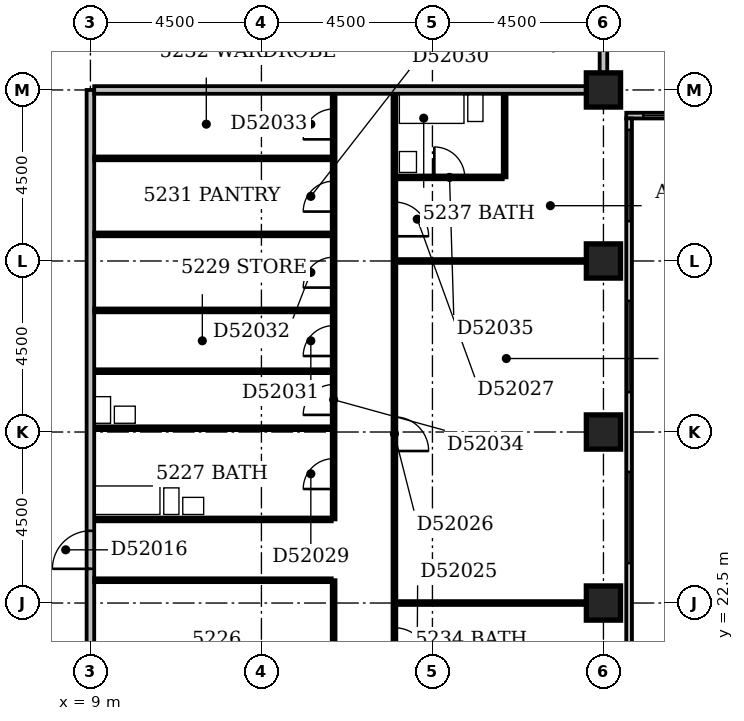
"""IFC4 building model, lengths in metres.
Left out: names, types, materials, properties, quantities, classifications, styles, units other than length and angle.
Written with IfcOpenShell. Run it as: python <this file> out.ifc"""

import sys

from ifc_helpers import new_model, si_unit, direction, frame, frame_2d, origin, origin_2d, place, context, subcontext, project, spatial, rectangle, extrude, element, fill, save


model = new_model("IFC4")
c1 = context("Model", 3, precision=1e-05, world=origin(), true_north=direction((0.0, 1.0)))
c2 = subcontext(c1, "Body", "Model", "MODEL_VIEW")
j1 = project(units=[si_unit("LENGTHUNIT", "METRE"), si_unit("PLANEANGLEUNIT", "RADIAN")], contexts=[c1])
p1 = place(None, origin())
s1 = spatial("IfcSite", under=j1, at=p1, CompositionType="ELEMENT")
p2 = place(p1, origin())
s2 = spatial("IfcBuilding", under=s1, at=p2, CompositionType="ELEMENT")
p3 = place(p2, frame((0.0, 0.0, 204.2)))
s3 = spatial("IfcBuildingStorey", under=s2, at=p3, CompositionType="ELEMENT", Elevation=204.2)
for number, where, z_axis, x_axis in (
    (1, (22.5, 22.5, -0.3), (0.0, 0.0, 1.0), (1.0, 0.0, 0.0)),
    (2, (22.5, 27.0, -0.3), (0.0, 0.0, 1.0), (1.0, 0.0, 0.0)),
    (3, (22.5, 31.5, -0.3), (0.0, 0.0, 1.0), (1.0, 0.0, 0.0)),
    (4, (22.5, 36.0, -0.3), (0.0, 0.0, 1.0), (1.0, 0.0, 0.0)),
):
    element("IfcColumn", number, at=place(p3, frame(where, z_axis=z_axis, x_axis=x_axis)), inside=s3, PredefinedType="COLUMN", context=c2, shape_type="SweptSolid", body=[
        extrude(rectangle(XDim=0.9, YDim=0.9, at=origin_2d()), origin(), (0.0, 0.0, 1.0), 3.6),
    ])
p4 = place(p3, frame((23.175, 17.4, 0.0), z_axis=(0.0, 0.0, 1.0), x_axis=(0.0, 1.0, 0.0)))
e5 = element("IfcWall", 5, at=p4, inside=s3, PredefinedType="STANDARD", context=c2, shape_type="SweptSolid", body=[
    extrude(rectangle(XDim=17.85, YDim=0.15, at=frame_2d((8.925, 0.0))), origin(), (0.0, 0.0, 1.0), 2.7),
])
p5 = place(p4, frame((1.65, 0.0, 0.6)))
e6 = element("IfcOpeningElement", 6, at=p5, cuts=e5, PredefinedType="OPENING", context=c2, shape_type="SweptSolid", body=[
    extrude(rectangle(XDim=2.4, YDim=1.8, at=frame_2d((1.2, 0.9))), frame((0.0, 0.087, 0.0), z_axis=(0.0, -1.0, 0.0), x_axis=(1.0, 0.0, 0.0)), (0.0, 0.0, 1.0), 0.174),
])
p6 = place(p4, frame((6.15, 0.0, 0.6)))
e7 = element("IfcOpeningElement", 7, at=p6, cuts=e5, PredefinedType="OPENING", context=c2, shape_type="SweptSolid", body=[
    extrude(rectangle(XDim=2.4, YDim=1.8, at=frame_2d((1.2, 0.9))), frame((0.0, 0.087, 0.0), z_axis=(0.0, -1.0, 0.0), x_axis=(1.0, 0.0, 0.0)), (0.0, 0.0, 1.0), 0.174),
])
p7 = place(p4, frame((10.65, 0.0, 0.6)))
e8 = element("IfcOpeningElement", 8, at=p7, cuts=e5, PredefinedType="OPENING", context=c2, shape_type="SweptSolid", body=[
    extrude(rectangle(XDim=2.4, YDim=1.8, at=frame_2d((1.2, 0.9))), frame((0.0, 0.087, 0.0), z_axis=(0.0, -1.0, 0.0), x_axis=(1.0, 0.0, 0.0)), (0.0, 0.0, 1.0), 0.174),
])
p8 = place(p4, frame((15.15, 0.0, 0.6)))
e9 = element("IfcOpeningElement", 9, at=p8, cuts=e5, PredefinedType="OPENING", context=c2, shape_type="SweptSolid", body=[
    extrude(rectangle(XDim=2.4, YDim=1.8, at=frame_2d((1.2, 0.9))), frame((0.0, 0.087, 0.0), z_axis=(0.0, -1.0, 0.0), x_axis=(1.0, 0.0, 0.0)), (0.0, 0.0, 1.0), 0.174),
])
p9 = place(p3, frame((23.1, 35.325, 0.0), z_axis=(0.0, 0.0, 1.0), x_axis=(1.0, 0.0, 0.0)))
e10 = element("IfcWall", 10, at=p9, inside=s3, PredefinedType="STANDARD", context=c2, shape_type="SweptSolid", body=[
    extrude(rectangle(XDim=27.15, YDim=0.15, at=frame_2d((13.575, 0.0))), origin(), (0.0, 0.0, 1.0), 2.7),
])
p10 = place(p9, frame((0.45, 0.0, 0.6)))
e11 = element("IfcOpeningElement", 11, at=p10, cuts=e10, PredefinedType="OPENING", context=c2, shape_type="SweptSolid", body=[
    extrude(rectangle(XDim=2.4, YDim=1.8, at=frame_2d((1.2, 0.9))), frame((0.0, 0.087, 0.0), z_axis=(0.0, -1.0, 0.0), x_axis=(1.0, 0.0, 0.0)), (0.0, 0.0, 1.0), 0.174),
])
p11 = place(p9, frame((4.95, 0.0, 0.6)))
e12 = element("IfcOpeningElement", 12, at=p11, cuts=e10, PredefinedType="OPENING", context=c2, shape_type="SweptSolid", body=[
    extrude(rectangle(XDim=2.4, YDim=1.8, at=frame_2d((1.2, 0.9))), frame((0.0, 0.087, 0.0), z_axis=(0.0, -1.0, 0.0), x_axis=(1.0, 0.0, 0.0)), (0.0, 0.0, 1.0), 0.174),
])
p12 = place(p9, frame((9.118, 0.0, 0.6)))
e13 = element("IfcOpeningElement", 13, at=p12, cuts=e10, PredefinedType="OPENING", context=c2, shape_type="SweptSolid", body=[
    extrude(rectangle(XDim=0.45, YDim=1.8, at=frame_2d((0.225, 0.9))), frame((0.0, 0.087, 0.0), z_axis=(0.0, -1.0, 0.0), x_axis=(1.0, 0.0, 0.0)), (0.0, 0.0, 1.0), 0.174),
])
p13 = place(p9, frame((11.218, 0.0, 0.6)))
e14 = element("IfcOpeningElement", 14, at=p13, cuts=e10, PredefinedType="OPENING", context=c2, shape_type="SweptSolid", body=[
    extrude(rectangle(XDim=0.9, YDim=1.8, at=frame_2d((0.45, 0.9))), frame((0.0, 0.087, 0.0), z_axis=(0.0, -1.0, 0.0), x_axis=(1.0, 0.0, 0.0)), (0.0, 0.0, 1.0), 0.174),
])
p14 = place(p9, frame((13.61, 0.0, 0.6)))
e15 = element("IfcOpeningElement", 15, at=p14, cuts=e10, PredefinedType="OPENING", context=c2, shape_type="SweptSolid", body=[
    extrude(rectangle(XDim=1.2, YDim=1.8, at=frame_2d((0.6, 0.9))), frame((0.0, 0.087, 0.0), z_axis=(0.0, -1.0, 0.0), x_axis=(1.0, 0.0, 0.0)), (0.0, 0.0, 1.0), 0.174),
])
p15 = place(p9, frame((18.45, 0.0, 0.6)))
e16 = element("IfcOpeningElement", 16, at=p15, cuts=e10, PredefinedType="OPENING", context=c2, shape_type="SweptSolid", body=[
    extrude(rectangle(XDim=2.4, YDim=1.8, at=frame_2d((1.2, 0.9))), frame((0.0, 0.087, 0.0), z_axis=(0.0, -1.0, 0.0), x_axis=(1.0, 0.0, 0.0)), (0.0, 0.0, 1.0), 0.174),
])
p16 = place(p9, frame((22.95, 0.0, 0.6)))
e17 = element("IfcOpeningElement", 17, at=p16, cuts=e10, PredefinedType="OPENING", context=c2, shape_type="SweptSolid", body=[
    extrude(rectangle(XDim=2.4, YDim=1.8, at=frame_2d((1.2, 0.9))), frame((0.0, 0.087, 0.0), z_axis=(0.0, -1.0, 0.0), x_axis=(1.0, 0.0, 0.0)), (0.0, 0.0, 1.0), 0.174),
])
p17 = place(p3, frame((9.0, 5.0, 0.0), z_axis=(0.0, 0.0, 1.0), x_axis=(0.0, 1.0, 0.0)))
e18 = element("IfcWall", 18, at=p17, inside=s3, PredefinedType="PARTITIONING", context=c2, shape_type="SweptSolid", body=[
    extrude(rectangle(XDim=31.0, YDim=0.2, at=frame_2d((15.5, 0.0))), origin(), (0.0, 0.0, 1.0), 3.3),
])
p18 = place(p17, frame((18.4, 0.0, 0.0)))
e19 = element("IfcOpeningElement", 19, at=p18, cuts=e18, PredefinedType="OPENING", context=c2, shape_type="SweptSolid", body=[
    extrude(rectangle(XDim=1.0, YDim=2.1, at=frame_2d((0.5, 1.05))), frame((0.0, 0.112, 0.0), z_axis=(0.0, -1.0, 0.0), x_axis=(1.0, 0.0, 0.0)), (0.0, 0.0, 1.0), 0.224),
])
p19 = place(p17, frame((11.7, 0.0, 0.0)))
e20 = element("IfcOpeningElement", 20, at=p19, cuts=e18, PredefinedType="OPENING", context=c2, shape_type="SweptSolid", body=[
    extrude(rectangle(XDim=1.0, YDim=2.1, at=frame_2d((0.5, 1.05))), frame((0.0, 0.112, 0.0), z_axis=(0.0, -1.0, 0.0), x_axis=(1.0, 0.0, 0.0)), (0.0, 0.0, 1.0), 0.224),
])
p20 = place(p17, frame((1.5, 0.0, 0.0)))
e21 = element("IfcOpeningElement", 21, at=p20, cuts=e18, PredefinedType="OPENING", context=c2, shape_type="SweptSolid", body=[
    extrude(rectangle(XDim=0.9, YDim=2.1, at=frame_2d((0.45, 1.05))), frame((0.0, 0.112, 0.0), z_axis=(0.0, -1.0, 0.0), x_axis=(1.0, 0.0, 0.0)), (0.0, 0.0, 1.0), 0.224),
])
p21 = place(p3, frame((15.4, 18.1, 0.0), z_axis=(0.0, 0.0, 1.0), x_axis=(0.0, 1.0, 0.0)))
e22 = element("IfcWall", 22, at=p21, inside=s3, PredefinedType="PARTITIONING", context=c2, shape_type="SweptSolid", body=[
    extrude(rectangle(XDim=5.0, YDim=0.1, at=frame_2d((2.5, 0.0))), origin(), (0.0, 0.0, 1.0), 3.3),
])
p22 = place(p21, frame((2.0, 0.0, 0.0)))
e23 = element("IfcOpeningElement", 23, at=p22, cuts=e22, PredefinedType="OPENING", context=c2, shape_type="SweptSolid", body=[
    extrude(rectangle(XDim=0.9, YDim=2.1, at=frame_2d((0.45, 1.05))), frame((0.0, 0.062, 0.0), z_axis=(0.0, -1.0, 0.0), x_axis=(1.0, 0.0, 0.0)), (0.0, 0.0, 1.0), 0.124),
])
p23 = place(p3, frame((17.0, 18.1, 0.0), z_axis=(0.0, 0.0, 1.0), x_axis=(0.0, 1.0, 0.0)))
e24 = element("IfcWall", 24, at=p23, inside=s3, PredefinedType="PARTITIONING", context=c2, shape_type="SweptSolid", body=[
    extrude(rectangle(XDim=17.8, YDim=0.1, at=frame_2d((8.9, 0.0))), origin(), (0.0, 0.0, 1.0), 3.3),
])
p24 = place(p23, frame((2.85, 0.0, 0.0)))
e25 = element("IfcOpeningElement", 25, at=p24, cuts=e24, PredefinedType="OPENING", context=c2, shape_type="SweptSolid", body=[
    extrude(rectangle(XDim=0.9, YDim=2.1, at=frame_2d((0.45, 1.05))), frame((0.0, 0.062, 0.0), z_axis=(0.0, -1.0, 0.0), x_axis=(1.0, 0.0, 0.0)), (0.0, 0.0, 1.0), 0.124),
])
p25 = place(p23, frame((8.4, 0.0, 0.0)))
e26 = element("IfcOpeningElement", 26, at=p25, cuts=e24, PredefinedType="OPENING", context=c2, shape_type="SweptSolid", body=[
    extrude(rectangle(XDim=0.9, YDim=2.1, at=frame_2d((0.45, 1.05))), frame((0.0, 0.062, 0.0), z_axis=(0.0, -1.0, 0.0), x_axis=(1.0, 0.0, 0.0)), (0.0, 0.0, 1.0), 0.124),
])
p26 = place(p23, frame((14.05, 0.0, 0.0)))
e27 = element("IfcOpeningElement", 27, at=p26, cuts=e24, PredefinedType="OPENING", context=c2, shape_type="SweptSolid", body=[
    extrude(rectangle(XDim=0.9, YDim=2.1, at=frame_2d((0.45, 1.05))), frame((0.0, 0.062, 0.0), z_axis=(0.0, -1.0, 0.0), x_axis=(1.0, 0.0, 0.0)), (0.0, 0.0, 1.0), 0.124),
])
p27 = place(p3, frame((17.05, 22.5, 0.0), z_axis=(0.0, 0.0, 1.0), x_axis=(1.0, 0.0, 0.0)))
e28 = element("IfcWall", 28, at=p27, inside=s3, PredefinedType="PARTITIONING", context=c2, shape_type="SweptSolid", body=[
    extrude(rectangle(XDim=5.0, YDim=0.1, at=frame_2d((2.5, 0.0))), origin(), (0.0, 0.0, 1.0), 3.3),
])
p28 = place(p3, frame((9.1, 23.1, 0.0), z_axis=(0.0, 0.0, 1.0), x_axis=(1.0, 0.0, 0.0)))
e29 = element("IfcWall", 29, at=p28, inside=s3, PredefinedType="PARTITIONING", context=c2, shape_type="SweptSolid", body=[
    extrude(rectangle(XDim=6.25, YDim=0.1, at=frame_2d((3.125, 0.0))), origin(), (0.0, 0.0, 1.0), 3.3),
])
p29 = place(p3, frame((9.1, 24.7, 0.0), z_axis=(0.0, 0.0, 1.0), x_axis=(1.0, 0.0, 0.0)))
e30 = element("IfcWall", 30, at=p29, inside=s3, PredefinedType="PLUMBINGWALL", context=c2, shape_type="SweptSolid", body=[
    extrude(rectangle(XDim=6.25, YDim=0.1, at=frame_2d((3.125, 0.0))), origin(), (0.0, 0.0, 1.0), 3.3),
])
p30 = place(p3, frame((15.4, 24.7, 0.0), z_axis=(0.0, 0.0, 1.0), x_axis=(0.0, 1.0, 0.0)))
e31 = element("IfcWall", 31, at=p30, inside=s3, PredefinedType="PARTITIONING", context=c2, shape_type="SweptSolid", body=[
    extrude(rectangle(XDim=11.2, YDim=0.1, at=frame_2d((5.6, 0.0))), origin(), (0.0, 0.0, 1.0), 3.3),
])
p31 = place(p30, frame((0.8, 0.0, 0.0)))
e32 = element("IfcOpeningElement", 32, at=p31, cuts=e31, PredefinedType="OPENING", context=c2, shape_type="SweptSolid", body=[
    extrude(rectangle(XDim=0.8, YDim=2.1, at=frame_2d((0.4, 1.05))), frame((0.0, 0.062, 0.0), z_axis=(0.0, -1.0, 0.0), x_axis=(1.0, 0.0, 0.0)), (0.0, 0.0, 1.0), 0.124),
])
p32 = place(p30, frame((8.1, 0.0, 0.0)))
e33 = element("IfcOpeningElement", 33, at=p32, cuts=e31, PredefinedType="OPENING", context=c2, shape_type="SweptSolid", body=[
    extrude(rectangle(XDim=0.8, YDim=2.1, at=frame_2d((0.4, 1.05))), frame((0.0, 0.062, 0.0), z_axis=(0.0, -1.0, 0.0), x_axis=(1.0, 0.0, 0.0)), (0.0, 0.0, 1.0), 0.124),
])
p33 = place(p30, frame((4.3, 0.0, 0.0)))
e34 = element("IfcOpeningElement", 34, at=p33, cuts=e31, PredefinedType="OPENING", context=c2, shape_type="SweptSolid", body=[
    extrude(rectangle(XDim=0.8, YDim=2.1, at=frame_2d((0.4, 1.05))), frame((0.0, 0.062, 0.0), z_axis=(0.0, -1.0, 0.0), x_axis=(1.0, 0.0, 0.0)), (0.0, 0.0, 1.0), 0.124),
])
p34 = place(p30, frame((6.1, 0.0, 0.0)))
e35 = element("IfcOpeningElement", 35, at=p34, cuts=e31, PredefinedType="OPENING", context=c2, shape_type="SweptSolid", body=[
    extrude(rectangle(XDim=0.8, YDim=2.1, at=frame_2d((0.4, 1.05))), frame((0.0, 0.062, 0.0), z_axis=(0.0, -1.0, 0.0), x_axis=(1.0, 0.0, 0.0)), (0.0, 0.0, 1.0), 0.124),
])
p35 = place(p30, frame((10.0, 0.0, 0.0)))
e36 = element("IfcOpeningElement", 36, at=p35, cuts=e31, PredefinedType="OPENING", context=c2, shape_type="SweptSolid", body=[
    extrude(rectangle(XDim=0.8, YDim=2.1, at=frame_2d((0.4, 1.05))), frame((0.0, 0.062, 0.0), z_axis=(0.0, -1.0, 0.0), x_axis=(1.0, 0.0, 0.0)), (0.0, 0.0, 1.0), 0.124),
])
p36 = place(p30, frame((2.75, 0.0, 0.0)))
e37 = element("IfcOpeningElement", 37, at=p36, cuts=e31, PredefinedType="OPENING", context=c2, shape_type="SweptSolid", body=[
    extrude(rectangle(XDim=0.8, YDim=2.1, at=frame_2d((0.4, 1.05))), frame((0.0, 0.062, 0.0), z_axis=(0.0, -1.0, 0.0), x_axis=(1.0, 0.0, 0.0)), (0.0, 0.0, 1.0), 0.124),
])
p37 = place(p3, frame((9.1, 27.1, 0.0), z_axis=(0.0, 0.0, 1.0), x_axis=(1.0, 0.0, 0.0)))
e38 = element("IfcWall", 38, at=p37, inside=s3, PredefinedType="PLUMBINGWALL", context=c2, shape_type="SweptSolid", body=[
    extrude(rectangle(XDim=6.25, YDim=0.1, at=frame_2d((3.125, 0.0))), origin(), (0.0, 0.0, 1.0), 2.7),
])
p38 = place(p3, frame((9.1, 28.6, 0.0), z_axis=(0.0, 0.0, 1.0), x_axis=(1.0, 0.0, 0.0)))
e39 = element("IfcWall", 39, at=p38, inside=s3, PredefinedType="PLUMBINGWALL", context=c2, shape_type="SweptSolid", body=[
    extrude(rectangle(XDim=6.25, YDim=0.1, at=frame_2d((3.125, 0.0))), origin(), (0.0, 0.0, 1.0), 3.3),
])
p39 = place(p3, frame((9.1, 30.2, 0.0), z_axis=(0.0, 0.0, 1.0), x_axis=(1.0, 0.0, 0.0)))
e40 = element("IfcWall", 40, at=p39, inside=s3, PredefinedType="PARTITIONING", context=c2, shape_type="SweptSolid", body=[
    extrude(rectangle(XDim=6.25, YDim=0.1, at=frame_2d((3.125, 0.0))), origin(), (0.0, 0.0, 1.0), 3.3),
])
p40 = place(p3, frame((17.05, 31.5, 0.0), z_axis=(0.0, 0.0, 1.0), x_axis=(1.0, 0.0, 0.0)))
e41 = element("IfcWall", 41, at=p40, inside=s3, PredefinedType="PARTITIONING", context=c2, shape_type="SweptSolid", body=[
    extrude(rectangle(XDim=5.0, YDim=0.1, at=frame_2d((2.5, 0.0))), origin(), (0.0, 0.0, 1.0), 3.3),
])
p41 = place(p3, frame((9.1, 32.2, 0.0), z_axis=(0.0, 0.0, 1.0), x_axis=(1.0, 0.0, 0.0)))
e42 = element("IfcWall", 42, at=p41, inside=s3, PredefinedType="PARTITIONING", context=c2, shape_type="SweptSolid", body=[
    extrude(rectangle(XDim=6.25, YDim=0.1, at=frame_2d((3.125, 0.0))), origin(), (0.0, 0.0, 1.0), 3.3),
])
p42 = place(p3, frame((17.05, 33.7, 0.0), z_axis=(0.0, 0.0, 1.0), x_axis=(1.0, 0.0, 0.0)))
e43 = element("IfcWall", 43, at=p42, inside=s3, PredefinedType="PLUMBINGWALL", context=c2, shape_type="SweptSolid", body=[
    extrude(rectangle(XDim=2.8, YDim=0.1, at=frame_2d((1.4, 0.0))), origin(), (0.0, 0.0, 1.0), 3.3),
])
p43 = place(p42, frame((1.0, 0.0, 0.0)))
e44 = element("IfcOpeningElement", 44, at=p43, cuts=e43, PredefinedType="OPENING", context=c2, shape_type="SweptSolid", body=[
    extrude(rectangle(XDim=0.8, YDim=2.1, at=frame_2d((0.4, 1.05))), frame((0.0, 0.062, 0.0), z_axis=(0.0, -1.0, 0.0), x_axis=(1.0, 0.0, 0.0)), (0.0, 0.0, 1.0), 0.124),
])
p44 = place(p3, frame((19.9, 33.7, 0.0), z_axis=(0.0, 0.0, 1.0), x_axis=(0.0, 1.0, 0.0)))
e45 = element("IfcWall", 45, at=p44, inside=s3, PredefinedType="PLUMBINGWALL", context=c2, shape_type="SweptSolid", body=[
    extrude(rectangle(XDim=2.2, YDim=0.1, at=frame_2d((1.1, 0.0))), origin(), (0.0, 0.0, 1.0), 3.3),
])
p45 = place(p3, frame((9.1, 34.2, 0.0), z_axis=(0.0, 0.0, 1.0), x_axis=(1.0, 0.0, 0.0)))
e46 = element("IfcWall", 46, at=p45, inside=s3, PredefinedType="PARTITIONING", context=c2, shape_type="SweptSolid", body=[
    extrude(rectangle(XDim=6.25, YDim=0.1, at=frame_2d((3.125, 0.0))), origin(), (0.0, 0.0, 1.0), 3.3),
])
p46 = place(p3, frame((9.1, 36.0, 0.0), z_axis=(0.0, 0.0, 1.0), x_axis=(1.0, 0.0, 0.0)))
e47 = element("IfcWall", 47, at=p46, inside=s3, PredefinedType="PARTITIONING", context=c2, shape_type="SweptSolid", body=[
    extrude(rectangle(XDim=12.95, YDim=0.2, at=frame_2d((6.475, 0.0))), origin(), (0.0, 0.0, 1.0), 3.3),
])
p47 = place(p3, frame((22.5, 36.45, 0.0), z_axis=(0.0, 0.0, 1.0), x_axis=(0.0, 1.0, 0.0)))
e48 = element("IfcWall", 48, at=p47, inside=s3, PredefinedType="PARTITIONING", context=c2, shape_type="SweptSolid", body=[
    extrude(rectangle(XDim=13.05, YDim=0.2, at=frame_2d((6.525, 0.0))), origin(), (0.0, 0.0, 1.0), 3.3),
])
p48 = place(p6, origin())
e49 = element("IfcWindow", 49, at=p48, inside=s3, PartitioningType="SINGLE_PANEL", PredefinedType="WINDOW", context=c2, shape_type="SweptSolid", body=[
    extrude(rectangle(XDim=2.4, YDim=1.8, at=frame_2d((1.2, 0.9))), frame((0.0, 0.03, 0.0), z_axis=(0.0, -1.0, 0.0), x_axis=(1.0, 0.0, 0.0)), (0.0, 0.0, 1.0), 0.06),
])
fill(e7, e49)
p49 = place(p7, origin())
e50 = element("IfcWindow", 50, at=p49, inside=s3, PartitioningType="SINGLE_PANEL", PredefinedType="WINDOW", context=c2, shape_type="SweptSolid", body=[
    extrude(rectangle(XDim=2.4, YDim=1.8, at=frame_2d((1.2, 0.9))), frame((0.0, 0.03, 0.0), z_axis=(0.0, -1.0, 0.0), x_axis=(1.0, 0.0, 0.0)), (0.0, 0.0, 1.0), 0.06),
])
fill(e8, e50)
p50 = place(p8, origin())
e51 = element("IfcWindow", 51, at=p50, inside=s3, PartitioningType="SINGLE_PANEL", PredefinedType="WINDOW", context=c2, shape_type="SweptSolid", body=[
    extrude(rectangle(XDim=2.4, YDim=1.8, at=frame_2d((1.2, 0.9))), frame((0.0, 0.03, 0.0), z_axis=(0.0, -1.0, 0.0), x_axis=(1.0, 0.0, 0.0)), (0.0, 0.0, 1.0), 0.06),
])
fill(e9, e51)
p51 = place(p10, origin())
e52 = element("IfcWindow", 52, at=p51, inside=s3, PartitioningType="SINGLE_PANEL", PredefinedType="WINDOW", context=c2, shape_type="SweptSolid", body=[
    extrude(rectangle(XDim=2.4, YDim=1.8, at=frame_2d((1.2, 0.9))), frame((0.0, 0.03, 0.0), z_axis=(0.0, -1.0, 0.0), x_axis=(1.0, 0.0, 0.0)), (0.0, 0.0, 1.0), 0.06),
])
fill(e11, e52)
p52 = place(p18, origin())
e53 = element("IfcDoor", 53, at=p52, inside=s3, OperationType="SINGLE_SWING_LEFT", PredefinedType="DOOR", context=c2, shape_type="SweptSolid", body=[
    extrude(rectangle(XDim=1.0, YDim=2.1, at=frame_2d((0.5, 1.05))), frame((0.0, 0.025, 0.0), z_axis=(0.0, -1.0, 0.0), x_axis=(1.0, 0.0, 0.0)), (0.0, 0.0, 1.0), 0.05),
])
fill(e19, e53)
p53 = place(p24, frame((0.9, 0.0, 0.0), z_axis=(0.0, 0.0, 1.0), x_axis=(-1.0, 0.0, 0.0)))
e54 = element("IfcDoor", 54, at=p53, inside=s3, OperationType="SINGLE_SWING_RIGHT", PredefinedType="DOOR", context=c2, shape_type="SweptSolid", body=[
    extrude(rectangle(XDim=0.9, YDim=2.1, at=frame_2d((0.45, 1.05))), frame((0.0, 0.025, 0.0), z_axis=(0.0, -1.0, 0.0), x_axis=(1.0, 0.0, 0.0)), (0.0, 0.0, 1.0), 0.05),
])
fill(e25, e54)
p54 = place(p25, frame((0.9, 0.0, 0.0), z_axis=(0.0, 0.0, 1.0), x_axis=(-1.0, 0.0, 0.0)))
e55 = element("IfcDoor", 55, at=p54, inside=s3, OperationType="SINGLE_SWING_RIGHT", PredefinedType="DOOR", context=c2, shape_type="SweptSolid", body=[
    extrude(rectangle(XDim=0.9, YDim=2.1, at=frame_2d((0.45, 1.05))), frame((0.0, 0.025, 0.0), z_axis=(0.0, -1.0, 0.0), x_axis=(1.0, 0.0, 0.0)), (0.0, 0.0, 1.0), 0.05),
])
fill(e26, e55)
p55 = place(p26, frame((0.9, 0.0, 0.0), z_axis=(0.0, 0.0, 1.0), x_axis=(-1.0, 0.0, 0.0)))
e56 = element("IfcDoor", 56, at=p55, inside=s3, OperationType="SINGLE_SWING_RIGHT", PredefinedType="DOOR", context=c2, shape_type="SweptSolid", body=[
    extrude(rectangle(XDim=0.9, YDim=2.1, at=frame_2d((0.45, 1.05))), frame((0.0, 0.025, 0.0), z_axis=(0.0, -1.0, 0.0), x_axis=(1.0, 0.0, 0.0)), (0.0, 0.0, 1.0), 0.05),
])
fill(e27, e56)
p56 = place(p31, origin())
e57 = element("IfcDoor", 57, at=p56, inside=s3, OperationType="SINGLE_SWING_LEFT", PredefinedType="DOOR", context=c2, shape_type="SweptSolid", body=[
    extrude(rectangle(XDim=0.8, YDim=2.1, at=frame_2d((0.4, 1.05))), frame((0.0, 0.025, 0.0), z_axis=(0.0, -1.0, 0.0), x_axis=(1.0, 0.0, 0.0)), (0.0, 0.0, 1.0), 0.05),
])
fill(e32, e57)
p57 = place(p32, origin())
e58 = element("IfcDoor", 58, at=p57, inside=s3, OperationType="SINGLE_SWING_LEFT", PredefinedType="DOOR", context=c2, shape_type="SweptSolid", body=[
    extrude(rectangle(XDim=0.8, YDim=2.1, at=frame_2d((0.4, 1.05))), frame((0.0, 0.025, 0.0), z_axis=(0.0, -1.0, 0.0), x_axis=(1.0, 0.0, 0.0)), (0.0, 0.0, 1.0), 0.05),
])
fill(e33, e58)
p58 = place(p33, origin())
e59 = element("IfcDoor", 59, at=p58, inside=s3, OperationType="SINGLE_SWING_LEFT", PredefinedType="DOOR", context=c2, shape_type="SweptSolid", body=[
    extrude(rectangle(XDim=0.8, YDim=2.1, at=frame_2d((0.4, 1.05))), frame((0.0, 0.025, 0.0), z_axis=(0.0, -1.0, 0.0), x_axis=(1.0, 0.0, 0.0)), (0.0, 0.0, 1.0), 0.05),
])
fill(e34, e59)
p59 = place(p34, origin())
e60 = element("IfcDoor", 60, at=p59, inside=s3, OperationType="SINGLE_SWING_LEFT", PredefinedType="DOOR", context=c2, shape_type="SweptSolid", body=[
    extrude(rectangle(XDim=0.8, YDim=2.1, at=frame_2d((0.4, 1.05))), frame((0.0, 0.025, 0.0), z_axis=(0.0, -1.0, 0.0), x_axis=(1.0, 0.0, 0.0)), (0.0, 0.0, 1.0), 0.05),
])
fill(e35, e60)
p60 = place(p35, origin())
e61 = element("IfcDoor", 61, at=p60, inside=s3, OperationType="SINGLE_SWING_LEFT", PredefinedType="DOOR", context=c2, shape_type="SweptSolid", body=[
    extrude(rectangle(XDim=0.8, YDim=2.1, at=frame_2d((0.4, 1.05))), frame((0.0, 0.025, 0.0), z_axis=(0.0, -1.0, 0.0), x_axis=(1.0, 0.0, 0.0)), (0.0, 0.0, 1.0), 0.05),
])
fill(e36, e61)
p61 = place(p36, origin())
e62 = element("IfcDoor", 62, at=p61, inside=s3, OperationType="SINGLE_SWING_LEFT", PredefinedType="DOOR", context=c2, shape_type="SweptSolid", body=[
    extrude(rectangle(XDim=0.8, YDim=2.1, at=frame_2d((0.4, 1.05))), frame((0.0, 0.025, 0.0), z_axis=(0.0, -1.0, 0.0), x_axis=(1.0, 0.0, 0.0)), (0.0, 0.0, 1.0), 0.05),
])
fill(e37, e62)
p62 = place(p43, origin())
e63 = element("IfcDoor", 63, at=p62, inside=s3, OperationType="SINGLE_SWING_LEFT", PredefinedType="DOOR", context=c2, shape_type="SweptSolid", body=[
    extrude(rectangle(XDim=0.8, YDim=2.1, at=frame_2d((0.4, 1.05))), frame((0.0, 0.025, 0.0), z_axis=(0.0, -1.0, 0.0), x_axis=(1.0, 0.0, 0.0)), (0.0, 0.0, 1.0), 0.05),
])
fill(e44, e63)
save(model, sys.argv[1])
